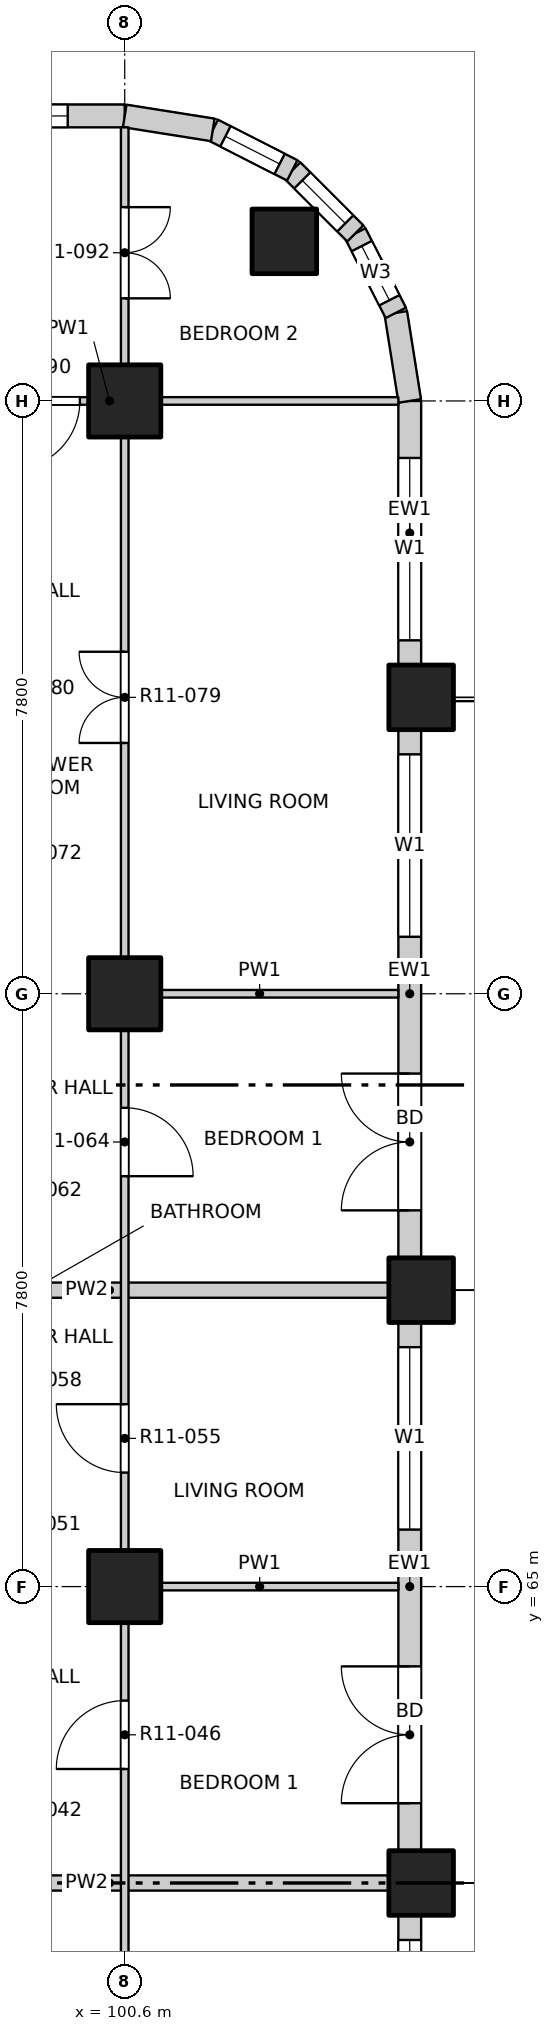
"""IFC4 building model, lengths in metres.
Left out: names, types, materials, properties, quantities, classifications, styles, units other than length and angle.
Written with IfcOpenShell. Run it as: python <this file> out.ifc"""

import sys

from ifc_helpers import new_model, si_unit, direction, frame, frame_2d, origin, origin_2d, place, context, subcontext, project, spatial, rectangle, extrude, element, fill, save


model = new_model("IFC4")
c1 = context("Model", 3, precision=1e-05, world=origin(), true_north=direction((0.0, 1.0)))
c2 = subcontext(c1, "Body", "Model", "MODEL_VIEW")
j1 = project(units=[si_unit("LENGTHUNIT", "METRE"), si_unit("PLANEANGLEUNIT", "RADIAN")], contexts=[c1])
p1 = place(None, origin())
s1 = spatial("IfcSite", under=j1, at=p1, CompositionType="ELEMENT")
p2 = place(p1, origin())
s2 = spatial("IfcBuilding", under=s1, at=p2, CompositionType="ELEMENT")
p3 = place(p2, frame((0.0, 0.0, 130.5)))
s3 = spatial("IfcBuildingStorey", under=s2, at=p3, CompositionType="ELEMENT", Elevation=130.5)
for number, where, z_axis, x_axis in (
    (1, (102.7, 82.7, -0.25), (0.0, 0.0, 1.0), (1.0, 0.0, 0.0)),
    (2, (104.5, 61.1, -0.25), (0.0, 0.0, 1.0), (1.0, 0.0, 0.0)),
    (3, (104.5, 68.9, -0.25), (0.0, 0.0, 1.0), (1.0, 0.0, 0.0)),
    (4, (104.5, 76.7, -0.25), (0.0, 0.0, 1.0), (1.0, 0.0, 0.0)),
):
    element("IfcColumn", number, at=place(p3, frame(where, z_axis=z_axis, x_axis=x_axis)), inside=s3, PredefinedType="COLUMN", context=c2, shape_type="SweptSolid", body=[
        extrude(rectangle(XDim=0.85, YDim=0.85, at=origin_2d()), origin(), (0.0, 0.0, 1.0), 3.4),
    ])
for number, where, z_axis, x_axis in (
    (5, (100.6, 65.0, -0.25), (0.0, 0.0, 1.0), (1.0, 0.0, 0.0)),
    (6, (100.6, 72.8, -0.25), (0.0, 0.0, 1.0), (1.0, 0.0, 0.0)),
    (7, (100.6, 80.6, -0.25), (0.0, 0.0, 1.0), (1.0, 0.0, 0.0)),
):
    element("IfcColumn", number, at=place(p3, frame(where, z_axis=z_axis, x_axis=x_axis)), inside=s3, PredefinedType="COLUMN", context=c2, shape_type="SweptSolid", body=[
        extrude(rectangle(XDim=0.95, YDim=0.95, at=origin_2d()), origin(), (0.0, 0.0, 1.0), 3.4),
    ])
p4 = place(p3, frame((104.35, 53.725, 0.0), z_axis=(0.0, 0.0, 1.0), x_axis=(0.0, 1.0, 0.0)))
e8 = element("IfcWall", 8, at=p4, inside=s3, PredefinedType="SOLIDWALL", context=c2, shape_type="SweptSolid", body=[
    extrude(rectangle(XDim=6.95, YDim=0.3, at=frame_2d((3.475, 0.0))), origin(), (0.0, 0.0, 1.0), 2.7),
])
p5 = place(p4, frame((0.625, 0.0, 0.0)))
e9 = element("IfcOpeningElement", 9, at=p5, cuts=e8, PredefinedType="OPENING", context=c2, shape_type="SweptSolid", body=[
    extrude(rectangle(XDim=1.8, YDim=2.4, at=frame_2d((0.9, 1.2))), frame((0.0, 0.16, 0.0), z_axis=(0.0, -1.0, 0.0), x_axis=(1.0, 0.0, 0.0)), (0.0, 0.0, 1.0), 0.32),
])
p6 = place(p4, frame((4.225, 0.0, 0.9)))
e10 = element("IfcOpeningElement", 10, at=p6, cuts=e8, PredefinedType="OPENING", context=c2, shape_type="SweptSolid", body=[
    extrude(rectangle(XDim=2.4, YDim=1.8, at=frame_2d((1.2, 0.9))), frame((0.0, 0.16, 0.0), z_axis=(0.0, -1.0, 0.0), x_axis=(1.0, 0.0, 0.0)), (0.0, 0.0, 1.0), 0.32),
])
p7 = place(p3, frame((104.35, 61.525, 0.0), z_axis=(0.0, 0.0, 1.0), x_axis=(0.0, 1.0, 0.0)))
e11 = element("IfcWall", 11, at=p7, inside=s3, PredefinedType="SOLIDWALL", context=c2, shape_type="SweptSolid", body=[
    extrude(rectangle(XDim=6.95, YDim=0.3, at=frame_2d((3.475, 0.0))), origin(), (0.0, 0.0, 1.0), 2.7),
])
p8 = place(p7, frame((0.625, 0.0, 0.0)))
e12 = element("IfcOpeningElement", 12, at=p8, cuts=e11, PredefinedType="OPENING", context=c2, shape_type="SweptSolid", body=[
    extrude(rectangle(XDim=1.8, YDim=2.4, at=frame_2d((0.9, 1.2))), frame((0.0, 0.16, 0.0), z_axis=(0.0, -1.0, 0.0), x_axis=(1.0, 0.0, 0.0)), (0.0, 0.0, 1.0), 0.32),
])
p9 = place(p7, frame((4.225, 0.0, 0.9)))
e13 = element("IfcOpeningElement", 13, at=p9, cuts=e11, PredefinedType="OPENING", context=c2, shape_type="SweptSolid", body=[
    extrude(rectangle(XDim=2.4, YDim=1.8, at=frame_2d((1.2, 0.9))), frame((0.0, 0.16, 0.0), z_axis=(0.0, -1.0, 0.0), x_axis=(1.0, 0.0, 0.0)), (0.0, 0.0, 1.0), 0.32),
])
p10 = place(p3, frame((104.35, 69.325, 0.0), z_axis=(0.0, 0.0, 1.0), x_axis=(0.0, 1.0, 0.0)))
e14 = element("IfcWall", 14, at=p10, inside=s3, PredefinedType="SOLIDWALL", context=c2, shape_type="SweptSolid", body=[
    extrude(rectangle(XDim=6.95, YDim=0.3, at=frame_2d((3.475, 0.0))), origin(), (0.0, 0.0, 1.0), 2.7),
])
p11 = place(p10, frame((0.625, 0.0, 0.0)))
e15 = element("IfcOpeningElement", 15, at=p11, cuts=e14, PredefinedType="OPENING", context=c2, shape_type="SweptSolid", body=[
    extrude(rectangle(XDim=1.8, YDim=2.4, at=frame_2d((0.9, 1.2))), frame((0.0, 0.16, 0.0), z_axis=(0.0, -1.0, 0.0), x_axis=(1.0, 0.0, 0.0)), (0.0, 0.0, 1.0), 0.32),
])
p12 = place(p10, frame((4.225, 0.0, 0.9)))
e16 = element("IfcOpeningElement", 16, at=p12, cuts=e14, PredefinedType="OPENING", context=c2, shape_type="SweptSolid", body=[
    extrude(rectangle(XDim=2.4, YDim=1.8, at=frame_2d((1.2, 0.9))), frame((0.0, 0.16, 0.0), z_axis=(0.0, -1.0, 0.0), x_axis=(1.0, 0.0, 0.0)), (0.0, 0.0, 1.0), 0.32),
])
p13 = place(p3, frame((104.35, 77.125, 0.0), z_axis=(0.0, 0.0, 1.0), x_axis=(0.0, 1.0, 0.0)))
e17 = element("IfcWall", 17, at=p13, inside=s3, PredefinedType="SOLIDWALL", context=c2, shape_type="SweptSolid", body=[
    extrude(rectangle(XDim=3.475, YDim=0.3, at=frame_2d((1.738, 0.0))), origin(), (0.0, 0.0, 1.0), 2.7),
])
p14 = place(p13, frame((0.325, 0.0, 0.9)))
e18 = element("IfcOpeningElement", 18, at=p14, cuts=e17, PredefinedType="OPENING", context=c2, shape_type="SweptSolid", body=[
    extrude(rectangle(XDim=2.4, YDim=1.8, at=frame_2d((1.2, 0.9))), frame((0.0, 0.16, 0.0), z_axis=(0.0, -1.0, 0.0), x_axis=(1.0, 0.0, 0.0)), (0.0, 0.0, 1.0), 0.32),
])
p15 = place(p3, frame((97.125, 84.35, 0.0), z_axis=(0.0, 0.0, 1.0), x_axis=(1.0, 0.0, 0.0)))
e19 = element("IfcWall", 19, at=p15, inside=s3, PredefinedType="SOLIDWALL", context=c2, shape_type="SweptSolid", body=[
    extrude(rectangle(XDim=3.475, YDim=0.3, at=frame_2d((1.738, 0.0))), origin(), (0.0, 0.0, 1.0), 2.7),
])
p16 = place(p15, frame((0.325, 0.0, 0.9)))
e20 = element("IfcOpeningElement", 20, at=p16, cuts=e19, PredefinedType="OPENING", context=c2, shape_type="SweptSolid", body=[
    extrude(rectangle(XDim=2.4, YDim=1.8, at=frame_2d((1.2, 0.9))), frame((0.0, 0.16, 0.0), z_axis=(0.0, -1.0, 0.0), x_axis=(1.0, 0.0, 0.0)), (0.0, 0.0, 1.0), 0.32),
])
p17 = place(p3, frame((104.35, 80.6, 0.0), z_axis=(0.0, 0.0, 1.0), x_axis=(-0.156496880861, 0.987678452879, 0.0)))
e21 = element("IfcWall", 21, at=p17, inside=s3, PredefinedType="SOLIDWALL", context=c2, shape_type="SweptSolid", body=[
    extrude(rectangle(XDim=1.173, YDim=0.3, at=frame_2d((0.586, 0.0))), origin(), (0.0, 0.0, 1.0), 2.7),
])
p18 = place(p3, frame((104.167, 81.759, 0.0), z_axis=(0.0, 0.0, 1.0), x_axis=(-0.454025524128, 0.890988677504, 0.0)))
e22 = element("IfcWall", 22, at=p18, inside=s3, PredefinedType="SOLIDWALL", context=c2, shape_type="SweptSolid", body=[
    extrude(rectangle(XDim=1.173, YDim=0.3, at=frame_2d((0.587, 0.0))), origin(), (0.0, 0.0, 1.0), 2.7),
])
p19 = place(p18, frame((0.187, 0.0, 0.9)))
e23 = element("IfcOpeningElement", 23, at=p19, cuts=e22, PredefinedType="OPENING", context=c2, shape_type="SweptSolid", body=[
    extrude(rectangle(XDim=0.8, YDim=1.2, at=frame_2d((0.4, 0.6))), frame((0.0, 0.16, 0.0), z_axis=(0.0, -1.0, 0.0), x_axis=(1.0, 0.0, 0.0)), (0.0, 0.0, 1.0), 0.32),
])
p20 = place(p3, frame((103.634, 82.804, 0.0), z_axis=(0.0, 0.0, 1.0), x_axis=(-0.707106781187, 0.707106781187, 0.0)))
e24 = element("IfcWall", 24, at=p20, inside=s3, PredefinedType="SOLIDWALL", context=c2, shape_type="SweptSolid", body=[
    extrude(rectangle(XDim=1.173, YDim=0.3, at=frame_2d((0.586, 0.0))), origin(), (0.0, 0.0, 1.0), 2.7),
])
p21 = place(p20, frame((0.187, 0.0, 0.9)))
e25 = element("IfcOpeningElement", 25, at=p21, cuts=e24, PredefinedType="OPENING", context=c2, shape_type="SweptSolid", body=[
    extrude(rectangle(XDim=0.8, YDim=1.2, at=frame_2d((0.4, 0.6))), frame((0.0, 0.16, 0.0), z_axis=(0.0, -1.0, 0.0), x_axis=(1.0, 0.0, 0.0)), (0.0, 0.0, 1.0), 0.32),
])
p22 = place(p3, frame((102.804, 83.634, 0.0), z_axis=(0.0, 0.0, 1.0), x_axis=(-0.890988677504, 0.454025524128, 0.0)))
e26 = element("IfcWall", 26, at=p22, inside=s3, PredefinedType="SOLIDWALL", context=c2, shape_type="SweptSolid", body=[
    extrude(rectangle(XDim=1.173, YDim=0.3, at=frame_2d((0.587, 0.0))), origin(), (0.0, 0.0, 1.0), 2.7),
])
p23 = place(p22, frame((0.187, 0.0, 0.9)))
e27 = element("IfcOpeningElement", 27, at=p23, cuts=e26, PredefinedType="OPENING", context=c2, shape_type="SweptSolid", body=[
    extrude(rectangle(XDim=0.8, YDim=1.2, at=frame_2d((0.4, 0.6))), frame((0.0, 0.16, 0.0), z_axis=(0.0, -1.0, 0.0), x_axis=(1.0, 0.0, 0.0)), (0.0, 0.0, 1.0), 0.32),
])
p24 = place(p3, frame((101.759, 84.167, 0.0), z_axis=(0.0, 0.0, 1.0), x_axis=(-0.987678452879, 0.156496880861, 0.0)))
e28 = element("IfcWall", 28, at=p24, inside=s3, PredefinedType="SOLIDWALL", context=c2, shape_type="SweptSolid", body=[
    extrude(rectangle(XDim=1.173, YDim=0.3, at=frame_2d((0.586, 0.0))), origin(), (0.0, 0.0, 1.0), 2.7),
])
p25 = place(p3, frame((96.6, 61.1, 0.0), z_axis=(0.0, 0.0, 1.0), x_axis=(1.0, 0.0, 0.0)))
e29 = element("IfcWall", 29, at=p25, inside=s3, PredefinedType="PARTITIONING", context=c2, shape_type="SweptSolid", body=[
    extrude(rectangle(XDim=7.6, YDim=0.2, at=frame_2d((3.8, 0.0))), origin(), (0.0, 0.0, 1.0), 2.55),
])
p26 = place(p3, frame((100.55, 65.0, 0.0), z_axis=(0.0, 0.0, 1.0), x_axis=(1.0, 0.0, 0.0)))
e30 = element("IfcWall", 30, at=p26, inside=s3, PredefinedType="PARTITIONING", context=c2, shape_type="SweptSolid", body=[
    extrude(rectangle(XDim=3.65, YDim=0.1, at=frame_2d((1.825, 0.0))), origin(), (0.0, 0.0, 1.0), 3.15),
])
p27 = place(p3, frame((96.6, 68.9, 0.0), z_axis=(0.0, 0.0, 1.0), x_axis=(1.0, 0.0, 0.0)))
e31 = element("IfcWall", 31, at=p27, inside=s3, PredefinedType="PARTITIONING", context=c2, shape_type="SweptSolid", body=[
    extrude(rectangle(XDim=7.6, YDim=0.2, at=frame_2d((3.8, 0.0))), origin(), (0.0, 0.0, 1.0), 2.55),
])
p28 = place(p3, frame((100.55, 72.8, 0.0), z_axis=(0.0, 0.0, 1.0), x_axis=(1.0, 0.0, 0.0)))
e32 = element("IfcWall", 32, at=p28, inside=s3, PredefinedType="PARTITIONING", context=c2, shape_type="SweptSolid", body=[
    extrude(rectangle(XDim=3.65, YDim=0.1, at=frame_2d((1.825, 0.0))), origin(), (0.0, 0.0, 1.0), 3.15),
])
p29 = place(p3, frame((96.6, 80.6, 0.0), z_axis=(0.0, 0.0, 1.0), x_axis=(1.0, 0.0, 0.0)))
e33 = element("IfcWall", 33, at=p29, inside=s3, PredefinedType="PARTITIONING", context=c2, shape_type="SweptSolid", body=[
    extrude(rectangle(XDim=7.6, YDim=0.1, at=frame_2d((3.8, 0.0))), origin(), (0.0, 0.0, 1.0), 3.15),
])
p30 = place(p29, frame((2.51, 0.0, 0.0)))
e34 = element("IfcOpeningElement", 34, at=p30, cuts=e33, PredefinedType="OPENING", context=c2, shape_type="SweptSolid", body=[
    extrude(rectangle(XDim=0.9, YDim=2.1, at=frame_2d((0.45, 1.05))), frame((0.0, 0.06, 0.0), z_axis=(0.0, -1.0, 0.0), x_axis=(1.0, 0.0, 0.0)), (0.0, 0.0, 1.0), 0.12),
])
p31 = place(p3, frame((100.6, 45.8, 0.0), z_axis=(0.0, 0.0, 1.0), x_axis=(0.0, 1.0, 0.0)))
e35 = element("IfcWall", 35, at=p31, inside=s3, PredefinedType="PARTITIONING", context=c2, shape_type="SweptSolid", body=[
    extrude(rectangle(XDim=38.4, YDim=0.1, at=frame_2d((19.2, 0.0))), origin(), (0.0, 0.0, 1.0), 3.15),
])
p32 = place(p31, frame((1.05, 0.0, 0.0)))
e36 = element("IfcOpeningElement", 36, at=p32, cuts=e35, PredefinedType="OPENING", context=c2, shape_type="SweptSolid", body=[
    extrude(rectangle(XDim=1.2, YDim=2.1, at=frame_2d((0.6, 1.05))), frame((0.0, 0.06, 0.0), z_axis=(0.0, -1.0, 0.0), x_axis=(1.0, 0.0, 0.0)), (0.0, 0.0, 1.0), 0.12),
])
p33 = place(p31, frame((5.1, 0.0, 0.0)))
e37 = element("IfcOpeningElement", 37, at=p33, cuts=e35, PredefinedType="OPENING", context=c2, shape_type="SweptSolid", body=[
    extrude(rectangle(XDim=0.9, YDim=2.1, at=frame_2d((0.45, 1.05))), frame((0.0, 0.06, 0.0), z_axis=(0.0, -1.0, 0.0), x_axis=(1.0, 0.0, 0.0)), (0.0, 0.0, 1.0), 0.12),
])
p34 = place(p31, frame((9.0, 0.0, 0.0)))
e38 = element("IfcOpeningElement", 38, at=p34, cuts=e35, PredefinedType="OPENING", context=c2, shape_type="SweptSolid", body=[
    extrude(rectangle(XDim=0.9, YDim=2.1, at=frame_2d((0.45, 1.05))), frame((0.0, 0.06, 0.0), z_axis=(0.0, -1.0, 0.0), x_axis=(1.0, 0.0, 0.0)), (0.0, 0.0, 1.0), 0.12),
])
p35 = place(p31, frame((12.9, 0.0, 0.0)))
e39 = element("IfcOpeningElement", 39, at=p35, cuts=e35, PredefinedType="OPENING", context=c2, shape_type="SweptSolid", body=[
    extrude(rectangle(XDim=0.9, YDim=2.1, at=frame_2d((0.45, 1.05))), frame((0.0, 0.06, 0.0), z_axis=(0.0, -1.0, 0.0), x_axis=(1.0, 0.0, 0.0)), (0.0, 0.0, 1.0), 0.12),
])
p36 = place(p31, frame((16.8, 0.0, 0.0)))
e40 = element("IfcOpeningElement", 40, at=p36, cuts=e35, PredefinedType="OPENING", context=c2, shape_type="SweptSolid", body=[
    extrude(rectangle(XDim=0.9, YDim=2.1, at=frame_2d((0.45, 1.05))), frame((0.0, 0.06, 0.0), z_axis=(0.0, -1.0, 0.0), x_axis=(1.0, 0.0, 0.0)), (0.0, 0.0, 1.0), 0.12),
])
p37 = place(p31, frame((20.7, 0.0, 0.0)))
e41 = element("IfcOpeningElement", 41, at=p37, cuts=e35, PredefinedType="OPENING", context=c2, shape_type="SweptSolid", body=[
    extrude(rectangle(XDim=0.9, YDim=2.1, at=frame_2d((0.45, 1.05))), frame((0.0, 0.06, 0.0), z_axis=(0.0, -1.0, 0.0), x_axis=(1.0, 0.0, 0.0)), (0.0, 0.0, 1.0), 0.12),
])
p38 = place(p31, frame((24.6, 0.0, 0.0)))
e42 = element("IfcOpeningElement", 42, at=p38, cuts=e35, PredefinedType="OPENING", context=c2, shape_type="SweptSolid", body=[
    extrude(rectangle(XDim=0.9, YDim=2.1, at=frame_2d((0.45, 1.05))), frame((0.0, 0.06, 0.0), z_axis=(0.0, -1.0, 0.0), x_axis=(1.0, 0.0, 0.0)), (0.0, 0.0, 1.0), 0.12),
])
p39 = place(p31, frame((30.3, 0.0, 0.0)))
e43 = element("IfcOpeningElement", 43, at=p39, cuts=e35, PredefinedType="OPENING", context=c2, shape_type="SweptSolid", body=[
    extrude(rectangle(XDim=1.2, YDim=2.1, at=frame_2d((0.6, 1.05))), frame((0.0, 0.06, 0.0), z_axis=(0.0, -1.0, 0.0), x_axis=(1.0, 0.0, 0.0)), (0.0, 0.0, 1.0), 0.12),
])
p40 = place(p31, frame((36.15, 0.0, 0.0)))
e44 = element("IfcOpeningElement", 44, at=p40, cuts=e35, PredefinedType="OPENING", context=c2, shape_type="SweptSolid", body=[
    extrude(rectangle(XDim=1.2, YDim=2.1, at=frame_2d((0.6, 1.05))), frame((0.0, 0.06, 0.0), z_axis=(0.0, -1.0, 0.0), x_axis=(1.0, 0.0, 0.0)), (0.0, 0.0, 1.0), 0.12),
])
p41 = place(p6, origin())
e45 = element("IfcWindow", 45, at=p41, inside=s3, PartitioningType="DOUBLE_PANEL_VERTICAL", PredefinedType="WINDOW", context=c2, shape_type="SweptSolid", body=[
    extrude(rectangle(XDim=2.4, YDim=1.8, at=frame_2d((1.2, 0.9))), frame((0.0, 0.03, 0.0), z_axis=(0.0, -1.0, 0.0), x_axis=(1.0, 0.0, 0.0)), (0.0, 0.0, 1.0), 0.06),
])
fill(e10, e45)
p42 = place(p8, origin())
e46 = element("IfcDoor", 46, at=p42, inside=s3, OperationType="DOUBLE_DOOR_SINGLE_SWING", PredefinedType="DOOR", context=c2, shape_type="SweptSolid", body=[
    extrude(rectangle(XDim=1.8, YDim=2.4, at=frame_2d((0.9, 1.2))), frame((0.0, 0.025, 0.0), z_axis=(0.0, -1.0, 0.0), x_axis=(1.0, 0.0, 0.0)), (0.0, 0.0, 1.0), 0.05),
])
fill(e12, e46)
p43 = place(p9, origin())
e47 = element("IfcWindow", 47, at=p43, inside=s3, PartitioningType="DOUBLE_PANEL_VERTICAL", PredefinedType="WINDOW", context=c2, shape_type="SweptSolid", body=[
    extrude(rectangle(XDim=2.4, YDim=1.8, at=frame_2d((1.2, 0.9))), frame((0.0, 0.03, 0.0), z_axis=(0.0, -1.0, 0.0), x_axis=(1.0, 0.0, 0.0)), (0.0, 0.0, 1.0), 0.06),
])
fill(e13, e47)
p44 = place(p11, origin())
e48 = element("IfcDoor", 48, at=p44, inside=s3, OperationType="DOUBLE_DOOR_SINGLE_SWING", PredefinedType="DOOR", context=c2, shape_type="SweptSolid", body=[
    extrude(rectangle(XDim=1.8, YDim=2.4, at=frame_2d((0.9, 1.2))), frame((0.0, 0.025, 0.0), z_axis=(0.0, -1.0, 0.0), x_axis=(1.0, 0.0, 0.0)), (0.0, 0.0, 1.0), 0.05),
])
fill(e15, e48)
p45 = place(p12, origin())
e49 = element("IfcWindow", 49, at=p45, inside=s3, PartitioningType="DOUBLE_PANEL_VERTICAL", PredefinedType="WINDOW", context=c2, shape_type="SweptSolid", body=[
    extrude(rectangle(XDim=2.4, YDim=1.8, at=frame_2d((1.2, 0.9))), frame((0.0, 0.03, 0.0), z_axis=(0.0, -1.0, 0.0), x_axis=(1.0, 0.0, 0.0)), (0.0, 0.0, 1.0), 0.06),
])
fill(e16, e49)
p46 = place(p14, origin())
e50 = element("IfcWindow", 50, at=p46, inside=s3, PartitioningType="DOUBLE_PANEL_VERTICAL", PredefinedType="WINDOW", context=c2, shape_type="SweptSolid", body=[
    extrude(rectangle(XDim=2.4, YDim=1.8, at=frame_2d((1.2, 0.9))), frame((0.0, 0.03, 0.0), z_axis=(0.0, -1.0, 0.0), x_axis=(1.0, 0.0, 0.0)), (0.0, 0.0, 1.0), 0.06),
])
fill(e18, e50)
p47 = place(p16, origin())
e51 = element("IfcWindow", 51, at=p47, inside=s3, PartitioningType="DOUBLE_PANEL_VERTICAL", PredefinedType="WINDOW", context=c2, shape_type="SweptSolid", body=[
    extrude(rectangle(XDim=2.4, YDim=1.8, at=frame_2d((1.2, 0.9))), frame((0.0, 0.03, 0.0), z_axis=(0.0, -1.0, 0.0), x_axis=(1.0, 0.0, 0.0)), (0.0, 0.0, 1.0), 0.06),
])
fill(e20, e51)
p48 = place(p19, origin())
e52 = element("IfcWindow", 52, at=p48, inside=s3, PartitioningType="SINGLE_PANEL", PredefinedType="WINDOW", context=c2, shape_type="SweptSolid", body=[
    extrude(rectangle(XDim=0.8, YDim=1.2, at=frame_2d((0.4, 0.6))), frame((0.0, 0.03, 0.0), z_axis=(0.0, -1.0, 0.0), x_axis=(1.0, 0.0, 0.0)), (0.0, 0.0, 1.0), 0.06),
])
fill(e23, e52)
p49 = place(p21, origin())
e53 = element("IfcWindow", 53, at=p49, inside=s3, PartitioningType="SINGLE_PANEL", PredefinedType="WINDOW", context=c2, shape_type="SweptSolid", body=[
    extrude(rectangle(XDim=0.8, YDim=1.2, at=frame_2d((0.4, 0.6))), frame((0.0, 0.03, 0.0), z_axis=(0.0, -1.0, 0.0), x_axis=(1.0, 0.0, 0.0)), (0.0, 0.0, 1.0), 0.06),
])
fill(e25, e53)
p50 = place(p23, origin())
e54 = element("IfcWindow", 54, at=p50, inside=s3, PartitioningType="SINGLE_PANEL", PredefinedType="WINDOW", context=c2, shape_type="SweptSolid", body=[
    extrude(rectangle(XDim=0.8, YDim=1.2, at=frame_2d((0.4, 0.6))), frame((0.0, 0.03, 0.0), z_axis=(0.0, -1.0, 0.0), x_axis=(1.0, 0.0, 0.0)), (0.0, 0.0, 1.0), 0.06),
])
fill(e27, e54)
p51 = place(p36, origin())
e55 = element("IfcDoor", 55, at=p51, inside=s3, OperationType="SINGLE_SWING_LEFT", PredefinedType="DOOR", context=c2, shape_type="SweptSolid", body=[
    extrude(rectangle(XDim=0.9, YDim=2.1, at=frame_2d((0.45, 1.05))), frame((0.0, 0.025, 0.0), z_axis=(0.0, -1.0, 0.0), x_axis=(1.0, 0.0, 0.0)), (0.0, 0.0, 1.0), 0.05),
])
fill(e40, e55)
p52 = place(p37, origin())
e56 = element("IfcDoor", 56, at=p52, inside=s3, OperationType="SINGLE_SWING_RIGHT", PredefinedType="DOOR", context=c2, shape_type="SweptSolid", body=[
    extrude(rectangle(XDim=0.9, YDim=2.1, at=frame_2d((0.45, 1.05))), frame((0.0, 0.025, 0.0), z_axis=(0.0, -1.0, 0.0), x_axis=(1.0, 0.0, 0.0)), (0.0, 0.0, 1.0), 0.05),
])
fill(e41, e56)
p53 = place(p38, origin())
e57 = element("IfcDoor", 57, at=p53, inside=s3, OperationType="SINGLE_SWING_RIGHT", PredefinedType="DOOR", context=c2, shape_type="SweptSolid", body=[
    extrude(rectangle(XDim=0.9, YDim=2.1, at=frame_2d((0.45, 1.05))), frame((0.0, 0.025, 0.0), z_axis=(0.0, -1.0, 0.0), x_axis=(1.0, 0.0, 0.0)), (0.0, 0.0, 1.0), 0.05),
])
fill(e42, e57)
p54 = place(p39, origin())
e58 = element("IfcDoor", 58, at=p54, inside=s3, OperationType="DOUBLE_DOOR_SINGLE_SWING", PredefinedType="DOOR", context=c2, shape_type="SweptSolid", body=[
    extrude(rectangle(XDim=1.2, YDim=2.1, at=frame_2d((0.6, 1.05))), frame((0.0, 0.025, 0.0), z_axis=(0.0, -1.0, 0.0), x_axis=(1.0, 0.0, 0.0)), (0.0, 0.0, 1.0), 0.05),
])
fill(e43, e58)
p55 = place(p30, origin())
e59 = element("IfcDoor", 59, at=p55, inside=s3, OperationType="SINGLE_SWING_RIGHT", PredefinedType="DOOR", context=c2, shape_type="SweptSolid", body=[
    extrude(rectangle(XDim=0.9, YDim=2.1, at=frame_2d((0.45, 1.05))), frame((0.0, 0.025, 0.0), z_axis=(0.0, -1.0, 0.0), x_axis=(1.0, 0.0, 0.0)), (0.0, 0.0, 1.0), 0.05),
])
fill(e34, e59)
p56 = place(p40, origin())
e60 = element("IfcDoor", 60, at=p56, inside=s3, OperationType="DOUBLE_DOOR_SINGLE_SWING", PredefinedType="DOOR", context=c2, shape_type="SweptSolid", body=[
    extrude(rectangle(XDim=1.2, YDim=2.1, at=frame_2d((0.6, 1.05))), frame((0.0, 0.025, 0.0), z_axis=(0.0, -1.0, 0.0), x_axis=(1.0, 0.0, 0.0)), (0.0, 0.0, 1.0), 0.05),
])
fill(e44, e60)
save(model, sys.argv[1])
